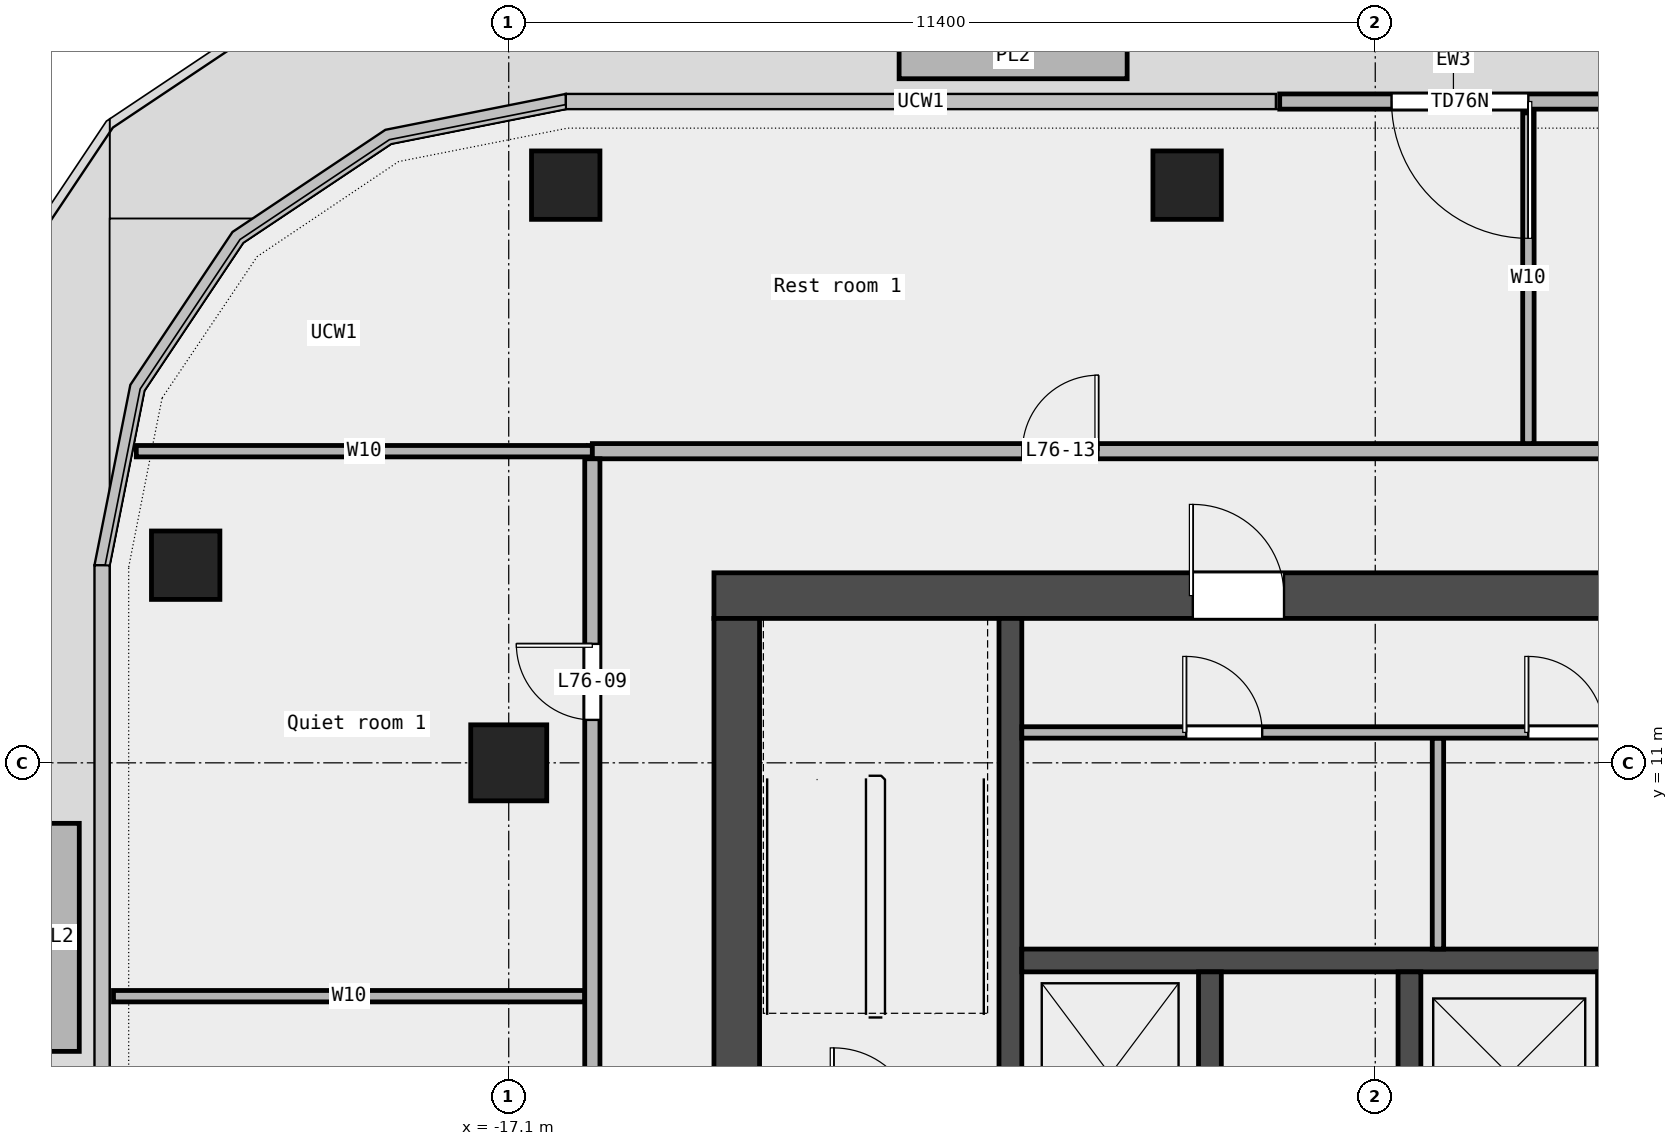
"""IFC4 building model, lengths in metres.
Left out: names, types, materials, properties, quantities, classifications, styles, units other than length and angle.
Written with IfcOpenShell. Run it as: python <this file> out.ifc"""

import sys

from ifc_helpers import new_model, si_unit, direction, frame, frame_2d, origin, origin_2d, place, context, subcontext, project, spatial, rectangle, extrude, element, fill, save


model = new_model("IFC4")
c1 = context("Model", 3, precision=1e-05, world=origin(), true_north=direction((0.0, 1.0)))
c2 = subcontext(c1, "Body", "Model", "MODEL_VIEW")
j1 = project(units=[si_unit("LENGTHUNIT", "METRE"), si_unit("PLANEANGLEUNIT", "RADIAN")], contexts=[c1])
p1 = place(None, origin())
s1 = spatial("IfcSite", under=j1, at=p1, CompositionType="ELEMENT")
p2 = place(p1, origin())
s2 = spatial("IfcBuilding", under=s1, at=p2, CompositionType="ELEMENT")
p3 = place(p2, frame((0.0, 0.0, 349.4)))
s3 = spatial("IfcBuildingStorey", under=s2, at=p3, CompositionType="ELEMENT", Elevation=349.4)
for number, where, z_axis, x_axis in (
    (1, (-8.175, 18.6, 0.0), (0.0, 0.0, 1.0), (1.0, 0.0, 0.0)),
    (2, (-16.35, 18.6, 0.0), (0.0, 0.0, 1.0), (1.0, 0.0, 0.0)),
    (3, (-21.35, 13.6, 0.0), (0.0, 0.0, 1.0), (1.0, 0.0, 0.0)),
):
    element("IfcColumn", number, at=place(p3, frame(where, z_axis=z_axis, x_axis=x_axis)), inside=s3, PredefinedType="COLUMN", context=c2, shape_type="SweptSolid", body=[
        extrude(rectangle(XDim=0.9, YDim=0.9, at=origin_2d()), origin(), (0.0, 0.0, 1.0), 3.65),
    ])
p4 = place(p3, frame((-17.1, 11.0, 0.0), z_axis=(0.0, 0.0, 1.0), x_axis=(1.0, 0.0, 0.0)))
e4 = element("IfcColumn", 4, at=p4, inside=s3, PredefinedType="COLUMN", context=c2, shape_type="SweptSolid", body=[
    extrude(rectangle(XDim=1.0, YDim=1.0, at=origin_2d()), origin(), (0.0, 0.0, 1.0), 3.65),
])
p5 = place(p3, frame((-2.386, 19.7, 0.0), z_axis=(0.0, 0.0, 1.0), x_axis=(-1.0, 0.0, 0.0)))
e5 = element("IfcWall", 5, at=p5, inside=s3, PredefinedType="STANDARD", context=c2, shape_type="SweptSolid", body=[
    extrude(rectangle(XDim=4.571, YDim=0.2, at=frame_2d((2.286, 0.0))), origin(), (0.0, 0.0, 1.0), 3.65),
])
p6 = place(p5, frame((1.3, 0.0, 0.0)))
e6 = element("IfcOpeningElement", 6, at=p6, cuts=e5, PredefinedType="OPENING", context=c2, shape_type="SweptSolid", body=[
    extrude(rectangle(XDim=1.8, YDim=2.4, at=frame_2d((0.9, 1.2))), frame((0.0, 0.112, 0.0), z_axis=(0.0, -1.0, 0.0), x_axis=(1.0, 0.0, 0.0)), (0.0, 0.0, 1.0), 0.224),
])
for number, where, z_axis, x_axis in (
    (7, (-8.964, 20.3, 0.0), (0.0, 0.0, 1.0), (-1.0, 0.0, 0.0)),
    (8, (-23.05, 10.204, 0.0), (0.0, 0.0, 1.0), (0.0, -1.0, 0.0)),
):
    element("IfcWall", number, at=place(p3, frame(where, z_axis=z_axis, x_axis=x_axis)), inside=s3, PredefinedType="STANDARD", context=c2, shape_type="SweptSolid", body=[
        extrude(rectangle(XDim=3.0, YDim=0.6, at=frame_2d((1.5, 0.0))), origin(), (0.0, 0.0, 1.0), 0.7),
    ])
p7 = place(p3, frame((-22.3, 7.93, 0.0), z_axis=(0.0, 0.0, 1.0), x_axis=(1.0, 0.0, 0.0)))
e9 = element("IfcWall", 9, at=p7, inside=s3, PredefinedType="PARTITIONING", context=c2, shape_type="SweptSolid", body=[
    extrude(rectangle(XDim=6.2, YDim=0.15, at=frame_2d((3.1, 0.0))), origin(), (0.0, 0.0, 1.0), 3.65),
])
p8 = place(p3, frame((-22.0, 15.1, 0.0), z_axis=(0.0, 0.0, 1.0), x_axis=(1.0, 0.0, 0.0)))
e10 = element("IfcWall", 10, at=p8, inside=s3, PredefinedType="PARTITIONING", context=c2, shape_type="SweptSolid", body=[
    extrude(rectangle(XDim=6.0, YDim=0.15, at=frame_2d((3.0, 0.0))), origin(), (0.0, 0.0, 1.0), 3.65),
])
p9 = place(p3, frame((-16.0, 15.1, 0.0), z_axis=(0.0, 0.0, 1.0), x_axis=(1.0, 0.0, 0.0)))
e11 = element("IfcWall", 11, at=p9, inside=s3, PredefinedType="PARTITIONING", context=c2, shape_type="SweptSolid", body=[
    extrude(rectangle(XDim=32.0, YDim=0.2, at=frame_2d((16.0, 0.0))), origin(), (0.0, 0.0, 1.0), 3.65),
])
p10 = place(p9, frame((17.24, 0.0, 0.0)))
e12 = element("IfcOpeningElement", 12, at=p10, cuts=e11, PredefinedType="OPENING", context=c2, shape_type="SweptSolid", body=[
    extrude(rectangle(XDim=1.2, YDim=2.1, at=frame_2d((0.6, 1.05))), frame((0.0, 0.112, 0.0), z_axis=(0.0, -1.0, 0.0), x_axis=(1.0, 0.0, 0.0)), (0.0, 0.0, 1.0), 0.224),
])
p11 = place(p9, frame((27.183, 0.0, 0.0)))
e13 = element("IfcOpeningElement", 13, at=p11, cuts=e11, PredefinedType="OPENING", context=c2, shape_type="SweptSolid", body=[
    extrude(rectangle(XDim=1.0, YDim=2.1, at=frame_2d((0.5, 1.05))), frame((0.0, 0.112, 0.0), z_axis=(0.0, -1.0, 0.0), x_axis=(1.0, 0.0, 0.0)), (0.0, 0.0, 1.0), 0.224),
])
p12 = place(p9, frame((5.657, 0.0, 0.0)))
e14 = element("IfcOpeningElement", 14, at=p12, cuts=e11, PredefinedType="OPENING", context=c2, shape_type="SweptSolid", body=[
    extrude(rectangle(XDim=1.0, YDim=2.1, at=frame_2d((0.5, 1.05))), frame((0.0, 0.112, 0.0), z_axis=(0.0, -1.0, 0.0), x_axis=(1.0, 0.0, 0.0)), (0.0, 0.0, 1.0), 0.224),
])
p13 = place(p3, frame((-16.0, -8.7, 0.0), z_axis=(0.0, 0.0, 1.0), x_axis=(0.0, 1.0, 0.0)))
e15 = element("IfcWall", 15, at=p13, inside=s3, PredefinedType="PARTITIONING", context=c2, shape_type="SweptSolid", body=[
    extrude(rectangle(XDim=23.7, YDim=0.2, at=frame_2d((11.85, 0.0))), origin(), (0.0, 0.0, 1.0), 3.65),
])
p14 = place(p13, frame((4.255, 0.0, 0.0)))
e16 = element("IfcOpeningElement", 16, at=p14, cuts=e15, PredefinedType="OPENING", context=c2, shape_type="SweptSolid", body=[
    extrude(rectangle(XDim=1.2, YDim=2.1, at=frame_2d((0.6, 1.05))), frame((0.0, 0.112, 0.0), z_axis=(0.0, -1.0, 0.0), x_axis=(1.0, 0.0, 0.0)), (0.0, 0.0, 1.0), 0.224),
])
p15 = place(p13, frame((20.265, 0.0, 0.0)))
e17 = element("IfcOpeningElement", 17, at=p15, cuts=e15, PredefinedType="OPENING", context=c2, shape_type="SweptSolid", body=[
    extrude(rectangle(XDim=1.0, YDim=2.1, at=frame_2d((0.5, 1.05))), frame((0.0, 0.112, 0.0), z_axis=(0.0, -1.0, 0.0), x_axis=(1.0, 0.0, 0.0)), (0.0, 0.0, 1.0), 0.224),
])
p16 = place(p13, frame((12.72, 0.0, 0.0)))
e18 = element("IfcOpeningElement", 18, at=p16, cuts=e15, PredefinedType="OPENING", context=c2, shape_type="SweptSolid", body=[
    extrude(rectangle(XDim=0.9, YDim=2.1, at=frame_2d((0.45, 1.05))), frame((0.0, 0.112, 0.0), z_axis=(0.0, -1.0, 0.0), x_axis=(1.0, 0.0, 0.0)), (0.0, 0.0, 1.0), 0.224),
])
p17 = place(p3, frame((-3.685, 15.2, 0.0), z_axis=(0.0, 0.0, 1.0), x_axis=(0.0, 1.0, 0.0)))
e19 = element("IfcWall", 19, at=p17, inside=s3, PredefinedType="PARTITIONING", context=c2, shape_type="SweptSolid", body=[
    extrude(rectangle(XDim=4.35, YDim=0.15, at=frame_2d((2.175, 0.0))), origin(), (0.0, 0.0, 1.0), 3.65),
])
p18 = place(p3, frame((-14.4, 13.2, 0.0), z_axis=(0.0, 0.0, 1.0), x_axis=(1.0, 0.0, 0.0)))
e20 = element("IfcWall", 20, at=p18, inside=s3, PredefinedType="SHEAR", context=c2, shape_type="SweptSolid", body=[
    extrude(rectangle(XDim=28.8, YDim=0.6, at=frame_2d((14.4, 0.0))), origin(), (0.0, 0.0, 1.0), 3.7),
])
p19 = place(p18, frame((6.3, 0.0, 0.0)))
e21 = element("IfcOpeningElement", 21, at=p19, cuts=e20, PredefinedType="OPENING", context=c2, shape_type="SweptSolid", body=[
    extrude(rectangle(XDim=1.2, YDim=2.1, at=frame_2d((0.6, 1.05))), frame((0.0, 0.312, 0.0), z_axis=(0.0, -1.0, 0.0), x_axis=(1.0, 0.0, 0.0)), (0.0, 0.0, 1.0), 0.624),
])
p20 = place(p18, frame((21.3, 0.0, 0.0)))
e22 = element("IfcOpeningElement", 22, at=p20, cuts=e20, PredefinedType="OPENING", context=c2, shape_type="SweptSolid", body=[
    extrude(rectangle(XDim=1.2, YDim=2.1, at=frame_2d((0.6, 1.05))), frame((0.0, 0.312, 0.0), z_axis=(0.0, -1.0, 0.0), x_axis=(1.0, 0.0, 0.0)), (0.0, 0.0, 1.0), 0.624),
])
p21 = place(p3, frame((-14.1, -6.6, 0.0), z_axis=(0.0, 0.0, 1.0), x_axis=(0.0, 1.0, 0.0)))
e23 = element("IfcWall", 23, at=p21, inside=s3, PredefinedType="SHEAR", context=c2, shape_type="SweptSolid", body=[
    extrude(rectangle(XDim=19.5, YDim=0.6, at=frame_2d((9.75, 0.0))), origin(), (0.0, 0.0, 1.0), 3.7),
])
p22 = place(p21, frame((9.3, 0.0, 0.0)))
e24 = element("IfcOpeningElement", 24, at=p22, cuts=e23, PredefinedType="OPENING", context=c2, shape_type="SweptSolid", body=[
    extrude(rectangle(XDim=1.8, YDim=2.1, at=frame_2d((0.9, 1.05))), frame((0.0, 0.312, 0.0), z_axis=(0.0, -1.0, 0.0), x_axis=(1.0, 0.0, 0.0)), (0.0, 0.0, 1.0), 0.624),
])
p23 = place(p3, frame((-10.5, 5.25, 0.0), z_axis=(0.0, 0.0, 1.0), x_axis=(0.0, 1.0, 0.0)))
e25 = element("IfcWall", 25, at=p23, inside=s3, PredefinedType="SHEAR", context=c2, shape_type="SweptSolid", body=[
    extrude(rectangle(XDim=7.65, YDim=0.3, at=frame_2d((3.825, 0.0))), origin(), (0.0, 0.0, 1.0), 3.7),
])
p24 = place(p3, frame((-10.35, 8.4, 0.0), z_axis=(0.0, 0.0, 1.0), x_axis=(1.0, 0.0, 0.0)))
e26 = element("IfcWall", 26, at=p24, inside=s3, PredefinedType="SOLIDWALL", context=c2, shape_type="SweptSolid", body=[
    extrude(rectangle(XDim=20.7, YDim=0.3, at=frame_2d((10.35, 0.0))), origin(), (0.0, 0.0, 1.0), 3.7),
])
for number, where, z_axis, x_axis in (
    (27, (-7.875, 5.55, 0.0), (0.0, 0.0, 1.0), (0.0, 1.0, 0.0)),
    (28, (-5.25, 5.55, 0.0), (0.0, 0.0, 1.0), (0.0, 1.0, 0.0)),
    (29, (-2.625, 5.55, 0.0), (0.0, 0.0, 1.0), (0.0, 1.0, 0.0)),
):
    element("IfcWall", number, at=place(p3, frame(where, z_axis=z_axis, x_axis=x_axis)), inside=s3, PredefinedType="SOLIDWALL", context=c2, shape_type="SweptSolid", body=[
        extrude(rectangle(XDim=2.7, YDim=0.3, at=frame_2d((1.35, 0.0))), origin(), (0.0, 0.0, 1.0), 3.7),
    ])
p25 = place(p3, frame((-4.875, 8.55, 0.0), z_axis=(0.0, 0.0, 1.0), x_axis=(0.0, 1.0, 0.0)))
e30 = element("IfcWall", 30, at=p25, inside=s3, PredefinedType="PARTITIONING", context=c2, shape_type="SweptSolid", body=[
    extrude(rectangle(XDim=2.775, YDim=0.15, at=frame_2d((1.387, 0.0))), origin(), (0.0, 0.0, 1.0), 3.7),
])
p26 = place(p3, frame((-10.35, 11.4, 0.0), z_axis=(0.0, 0.0, 1.0), x_axis=(1.0, 0.0, 0.0)))
e31 = element("IfcWall", 31, at=p26, inside=s3, PredefinedType="PARTITIONING", context=c2, shape_type="SweptSolid", body=[
    extrude(rectangle(XDim=20.7, YDim=0.15, at=frame_2d((10.35, 0.0))), origin(), (0.0, 0.0, 1.0), 3.7),
])
p27 = place(p26, frame((2.163, 0.0, 0.0)))
e32 = element("IfcOpeningElement", 32, at=p27, cuts=e31, PredefinedType="OPENING", context=c2, shape_type="SweptSolid", body=[
    extrude(rectangle(XDim=1.0, YDim=2.1, at=frame_2d((0.5, 1.05))), frame((0.0, 0.087, 0.0), z_axis=(0.0, -1.0, 0.0), x_axis=(1.0, 0.0, 0.0)), (0.0, 0.0, 1.0), 0.174),
])
p28 = place(p26, frame((6.663, 0.0, 0.0)))
e33 = element("IfcOpeningElement", 33, at=p28, cuts=e31, PredefinedType="OPENING", context=c2, shape_type="SweptSolid", body=[
    extrude(rectangle(XDim=1.0, YDim=2.1, at=frame_2d((0.5, 1.05))), frame((0.0, 0.087, 0.0), z_axis=(0.0, -1.0, 0.0), x_axis=(1.0, 0.0, 0.0)), (0.0, 0.0, 1.0), 0.174),
])
p29 = place(p26, frame((10.413, 0.0, 0.0)))
e34 = element("IfcOpeningElement", 34, at=p29, cuts=e31, PredefinedType="OPENING", context=c2, shape_type="SweptSolid", body=[
    extrude(rectangle(XDim=1.0, YDim=2.1, at=frame_2d((0.5, 1.05))), frame((0.0, 0.087, 0.0), z_axis=(0.0, -1.0, 0.0), x_axis=(1.0, 0.0, 0.0)), (0.0, 0.0, 1.0), 0.174),
])
p30 = place(p26, frame((13.975, 0.0, 0.0)))
e35 = element("IfcOpeningElement", 35, at=p30, cuts=e31, PredefinedType="OPENING", context=c2, shape_type="SweptSolid", body=[
    extrude(rectangle(XDim=1.0, YDim=2.1, at=frame_2d((0.5, 1.05))), frame((0.0, 0.087, 0.0), z_axis=(0.0, -1.0, 0.0), x_axis=(1.0, 0.0, 0.0)), (0.0, 0.0, 1.0), 0.174),
])
p31 = place(p26, frame((17.913, 0.0, 0.0)))
e36 = element("IfcOpeningElement", 36, at=p31, cuts=e31, PredefinedType="OPENING", context=c2, shape_type="SweptSolid", body=[
    extrude(rectangle(XDim=1.0, YDim=2.1, at=frame_2d((0.5, 1.05))), frame((0.0, 0.087, 0.0), z_axis=(0.0, -1.0, 0.0), x_axis=(1.0, 0.0, 0.0)), (0.0, 0.0, 1.0), 0.174),
])
p32 = place(p6, origin())
e37 = element("IfcDoor", 37, at=p32, inside=s3, OperationType="DOUBLE_DOOR_SINGLE_SWING", PredefinedType="DOOR", context=c2, shape_type="SweptSolid", body=[
    extrude(rectangle(XDim=1.8, YDim=2.4, at=frame_2d((0.9, 1.2))), frame((0.0, 0.025, 0.0), z_axis=(0.0, -1.0, 0.0), x_axis=(1.0, 0.0, 0.0)), (0.0, 0.0, 1.0), 0.05),
])
fill(e6, e37)
p33 = place(p15, origin())
e38 = element("IfcDoor", 38, at=p33, inside=s3, OperationType="SINGLE_SWING_RIGHT", PredefinedType="DOOR", context=c2, shape_type="SweptSolid", body=[
    extrude(rectangle(XDim=1.0, YDim=2.1, at=frame_2d((0.5, 1.05))), frame((0.0, 0.025, 0.0), z_axis=(0.0, -1.0, 0.0), x_axis=(1.0, 0.0, 0.0)), (0.0, 0.0, 1.0), 0.05),
])
fill(e17, e38)
p34 = place(p12, origin())
e39 = element("IfcDoor", 39, at=p34, inside=s3, OperationType="SINGLE_SWING_RIGHT", PredefinedType="DOOR", context=c2, shape_type="SweptSolid", body=[
    extrude(rectangle(XDim=1.0, YDim=2.1, at=frame_2d((0.5, 1.05))), frame((0.0, 0.025, 0.0), z_axis=(0.0, -1.0, 0.0), x_axis=(1.0, 0.0, 0.0)), (0.0, 0.0, 1.0), 0.05),
])
fill(e14, e39)
p35 = place(p27, origin())
e40 = element("IfcDoor", 40, at=p35, inside=s3, OperationType="SINGLE_SWING_LEFT", PredefinedType="DOOR", context=c2, shape_type="SweptSolid", body=[
    extrude(rectangle(XDim=1.0, YDim=2.1, at=frame_2d((0.5, 1.05))), frame((0.0, 0.025, 0.0), z_axis=(0.0, -1.0, 0.0), x_axis=(1.0, 0.0, 0.0)), (0.0, 0.0, 1.0), 0.05),
])
fill(e32, e40)
p36 = place(p28, origin())
e41 = element("IfcDoor", 41, at=p36, inside=s3, OperationType="SINGLE_SWING_LEFT", PredefinedType="DOOR", context=c2, shape_type="SweptSolid", body=[
    extrude(rectangle(XDim=1.0, YDim=2.1, at=frame_2d((0.5, 1.05))), frame((0.0, 0.025, 0.0), z_axis=(0.0, -1.0, 0.0), x_axis=(1.0, 0.0, 0.0)), (0.0, 0.0, 1.0), 0.05),
])
fill(e33, e41)
p37 = place(p19, origin())
e42 = element("IfcDoor", 42, at=p37, inside=s3, OperationType="SINGLE_SWING_LEFT", PredefinedType="DOOR", context=c2, shape_type="SweptSolid", body=[
    extrude(rectangle(XDim=1.2, YDim=2.1, at=frame_2d((0.6, 1.05))), frame((0.0, 0.025, 0.0), z_axis=(0.0, -1.0, 0.0), x_axis=(1.0, 0.0, 0.0)), (0.0, 0.0, 1.0), 0.05),
])
fill(e21, e42)
save(model, sys.argv[1])
